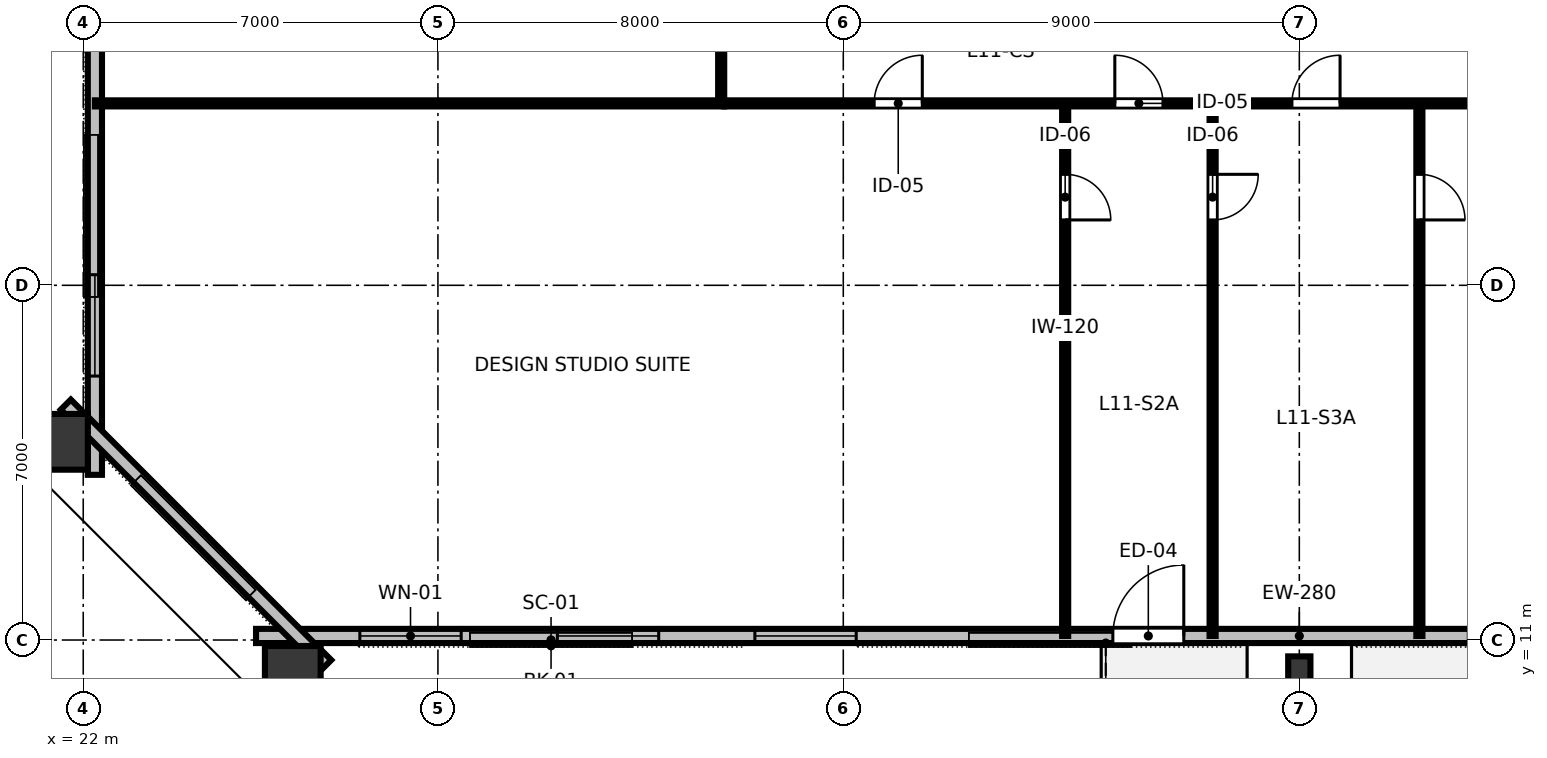
"""IFC4 building model, lengths in metres.
Left out: names, types, materials, properties, quantities, classifications, styles, units other than length and angle.
Written with IfcOpenShell. Run it as: python <this file> out.ifc"""

import sys

from ifc_helpers import new_model, si_unit, direction, frame, frame_2d, origin, origin_2d, place, context, subcontext, project, spatial, rectangle, hollow_rectangle, i_section, extrude, element, fill, save


model = new_model("IFC4")
c1 = context("Model", 3, precision=1e-05, world=origin(), true_north=direction((0.0, 1.0)))
c2 = subcontext(c1, "Body", "Model", "MODEL_VIEW")
j1 = project(units=[si_unit("LENGTHUNIT", "METRE"), si_unit("PLANEANGLEUNIT", "RADIAN")], contexts=[c1])
p1 = place(None, origin())
s1 = spatial("IfcSite", under=j1, at=p1, CompositionType="ELEMENT")
p2 = place(p1, origin())
s2 = spatial("IfcBuilding", under=s1, at=p2, CompositionType="ELEMENT")
p3 = place(p2, frame((0.0, 0.0, 46.0)))
s3 = spatial("IfcBuildingStorey", under=s2, at=p3, CompositionType="ELEMENT", Elevation=46.0)
p4 = place(p3, frame((26.135, 10.232, 0.0), z_axis=(-0.047892071217, -0.094241724682, 0.994396725077), x_axis=(0.891490015287, -0.453040343284, 0.0)))
e1 = element("IfcColumn", 1, at=p4, inside=s3, PredefinedType="COLUMN", context=c2, shape_type="SweptSolid", body=[
    extrude(hollow_rectangle(XDim=1.1, YDim=1.3, WallThickness=0.07, at=origin_2d()), origin(), (0.0, 0.0, 1.0), 3.166),
])
p5 = place(p3, frame((46.0, 10.42, 0.0), z_axis=(0.0, -0.094809092628, 0.995495472594), x_axis=(1.0, 0.0, 0.0)))
e2 = element("IfcColumn", 2, at=p5, inside=s3, PredefinedType="COLUMN", context=c2, shape_type="SweptSolid", body=[
    extrude(i_section(OverallWidth=0.439, OverallDepth=0.514, WebThickness=0.06, FlangeThickness=0.097, FilletRadius=0.025, at=origin_2d()), origin(), (0.0, 0.0, 1.0), 3.162),
])
p6 = place(p3, frame((21.441, 14.911, 0.0), z_axis=(-0.109942970926, -0.032204738505, 0.993416024615), x_axis=(0.953356995981, 0.279259442411, 0.114562655514)))
e3 = element("IfcColumn", 3, at=p6, inside=s3, PredefinedType="COLUMN", context=c2, shape_type="SweptSolid", body=[
    extrude(hollow_rectangle(XDim=1.1, YDim=1.3, WallThickness=0.07, at=origin_2d()), origin(), (0.0, 0.0, 1.0), 3.169),
])
p7 = place(p3, frame((25.41, 11.08, 0.0), z_axis=(0.0, 0.0, 1.0), x_axis=(1.0, 0.0, 0.0)))
e4 = element("IfcWall", 4, at=p7, inside=s3, PredefinedType="STANDARD", context=c2, shape_type="SweptSolid", body=[
    extrude(rectangle(XDim=41.18, YDim=0.28, at=frame_2d((20.59, 0.0))), origin(), (0.0, 0.0, 1.0), 3.15),
])
p8 = place(p7, frame((16.91, 0.0, 0.0)))
e5 = element("IfcOpeningElement", 5, at=p8, cuts=e4, PredefinedType="OPENING", context=c2, shape_type="SweptSolid", body=[
    extrude(rectangle(XDim=1.4, YDim=2.15, at=frame_2d((0.7, 1.075))), frame((0.0, 0.15, 0.0), z_axis=(0.0, -1.0, 0.0), x_axis=(1.0, 0.0, 0.0)), (0.0, 0.0, 1.0), 0.3),
])
p9 = place(p7, frame((2.049, 0.0, 0.8)))
e6 = element("IfcOpeningElement", 6, at=p9, cuts=e4, PredefinedType="OPENING", context=c2, shape_type="SweptSolid", body=[
    extrude(rectangle(XDim=2.0, YDim=1.95, at=frame_2d((1.0, 0.975))), frame((0.0, 0.15, 0.0), z_axis=(0.0, -1.0, 0.0), x_axis=(1.0, 0.0, 0.0)), (0.0, 0.0, 1.0), 0.3),
])
p10 = place(p7, frame((5.947, 0.0, 0.8)))
e7 = element("IfcOpeningElement", 7, at=p10, cuts=e4, PredefinedType="OPENING", context=c2, shape_type="SweptSolid", body=[
    extrude(rectangle(XDim=2.0, YDim=1.95, at=frame_2d((1.0, 0.975))), frame((0.0, 0.15, 0.0), z_axis=(0.0, -1.0, 0.0), x_axis=(1.0, 0.0, 0.0)), (0.0, 0.0, 1.0), 0.3),
])
p11 = place(p7, frame((9.845, 0.0, 0.8)))
e8 = element("IfcOpeningElement", 8, at=p11, cuts=e4, PredefinedType="OPENING", context=c2, shape_type="SweptSolid", body=[
    extrude(rectangle(XDim=2.0, YDim=1.95, at=frame_2d((1.0, 0.975))), frame((0.0, 0.15, 0.0), z_axis=(0.0, -1.0, 0.0), x_axis=(1.0, 0.0, 0.0)), (0.0, 0.0, 1.0), 0.3),
])
p12 = place(p7, frame((25.437, 0.0, 0.8)))
e9 = element("IfcOpeningElement", 9, at=p12, cuts=e4, PredefinedType="OPENING", context=c2, shape_type="SweptSolid", body=[
    extrude(rectangle(XDim=2.0, YDim=1.95, at=frame_2d((1.0, 0.975))), frame((0.0, 0.15, 0.0), z_axis=(0.0, -1.0, 0.0), x_axis=(1.0, 0.0, 0.0)), (0.0, 0.0, 1.0), 0.3),
])
p13 = place(p7, frame((29.335, 0.0, 0.8)))
e10 = element("IfcOpeningElement", 10, at=p13, cuts=e4, PredefinedType="OPENING", context=c2, shape_type="SweptSolid", body=[
    extrude(rectangle(XDim=2.0, YDim=1.95, at=frame_2d((1.0, 0.975))), frame((0.0, 0.15, 0.0), z_axis=(0.0, -1.0, 0.0), x_axis=(1.0, 0.0, 0.0)), (0.0, 0.0, 1.0), 0.3),
])
p14 = place(p7, frame((33.233, 0.0, 0.8)))
e11 = element("IfcOpeningElement", 11, at=p14, cuts=e4, PredefinedType="OPENING", context=c2, shape_type="SweptSolid", body=[
    extrude(rectangle(XDim=2.0, YDim=1.95, at=frame_2d((1.0, 0.975))), frame((0.0, 0.15, 0.0), z_axis=(0.0, -1.0, 0.0), x_axis=(1.0, 0.0, 0.0)), (0.0, 0.0, 1.0), 0.3),
])
p15 = place(p7, frame((37.131, 0.0, 0.8)))
e12 = element("IfcOpeningElement", 12, at=p15, cuts=e4, PredefinedType="OPENING", context=c2, shape_type="SweptSolid", body=[
    extrude(rectangle(XDim=2.0, YDim=1.95, at=frame_2d((1.0, 0.975))), frame((0.0, 0.15, 0.0), z_axis=(0.0, -1.0, 0.0), x_axis=(1.0, 0.0, 0.0)), (0.0, 0.0, 1.0), 0.3),
])
p16 = place(p3, frame((22.23, 49.74, 0.0), z_axis=(0.0, 0.0, 1.0), x_axis=(0.0, -1.0, 0.0)))
e13 = element("IfcWall", 13, at=p16, inside=s3, PredefinedType="STANDARD", context=c2, shape_type="SweptSolid", body=[
    extrude(rectangle(XDim=35.48, YDim=0.28, at=frame_2d((17.74, 0.0))), origin(), (0.0, 0.0, 1.0), 3.15),
])
p17 = place(p16, frame((1.949, 0.0, 0.8)))
e14 = element("IfcOpeningElement", 14, at=p17, cuts=e13, PredefinedType="OPENING", context=c2, shape_type="SweptSolid", body=[
    extrude(rectangle(XDim=2.0, YDim=1.95, at=frame_2d((1.0, 0.975))), frame((0.0, 0.15, 0.0), z_axis=(0.0, -1.0, 0.0), x_axis=(1.0, 0.0, 0.0)), (0.0, 0.0, 1.0), 0.3),
])
p18 = place(p16, frame((9.344, 0.0, 0.8)))
e15 = element("IfcOpeningElement", 15, at=p18, cuts=e13, PredefinedType="OPENING", context=c2, shape_type="SweptSolid", body=[
    extrude(rectangle(XDim=2.0, YDim=1.95, at=frame_2d((1.0, 0.975))), frame((0.0, 0.15, 0.0), z_axis=(0.0, -1.0, 0.0), x_axis=(1.0, 0.0, 0.0)), (0.0, 0.0, 1.0), 0.3),
])
p19 = place(p16, frame((24.135, 0.0, 0.8)))
e16 = element("IfcOpeningElement", 16, at=p19, cuts=e13, PredefinedType="OPENING", context=c2, shape_type="SweptSolid", body=[
    extrude(rectangle(XDim=2.0, YDim=1.95, at=frame_2d((1.0, 0.975))), frame((0.0, 0.15, 0.0), z_axis=(0.0, -1.0, 0.0), x_axis=(1.0, 0.0, 0.0)), (0.0, 0.0, 1.0), 0.3),
])
p20 = place(p16, frame((31.531, 0.0, 0.8)))
e17 = element("IfcOpeningElement", 17, at=p20, cuts=e13, PredefinedType="OPENING", context=c2, shape_type="SweptSolid", body=[
    extrude(rectangle(XDim=2.0, YDim=1.95, at=frame_2d((1.0, 0.975))), frame((0.0, 0.15, 0.0), z_axis=(0.0, -1.0, 0.0), x_axis=(1.0, 0.0, 0.0)), (0.0, 0.0, 1.0), 0.3),
])
p21 = place(p3, frame((21.656, 15.646, 0.0), z_axis=(0.0, 0.0, 1.0), x_axis=(0.707106781187, -0.707106781187, 0.0)))
e18 = element("IfcWall", 18, at=p21, inside=s3, PredefinedType="STANDARD", context=c2, shape_type="SweptSolid", body=[
    extrude(rectangle(XDim=7.268, YDim=0.28, at=frame_2d((3.634, 0.0))), origin(), (0.0, 0.0, 1.0), 3.15),
])
p22 = place(p3, frame((41.379, 21.59, 0.0), z_axis=(0.0, 0.0, 1.0), x_axis=(0.0, -1.0, 0.0)))
e19 = element("IfcWall", 19, at=p22, inside=s3, PredefinedType="PARTITIONING", context=c2, shape_type="SweptSolid", body=[
    extrude(rectangle(XDim=10.51, YDim=0.12, at=frame_2d((5.255, 0.0))), origin(), (0.0, 0.0, 1.0), 2.43),
])
p23 = place(p22, frame((1.4, 0.0, 0.0)))
e20 = element("IfcOpeningElement", 20, at=p23, cuts=e19, PredefinedType="OPENING", context=c2, shape_type="SweptSolid", body=[
    extrude(rectangle(XDim=0.9, YDim=2.15, at=frame_2d((0.45, 1.075))), frame((0.0, 0.07, 0.0), z_axis=(0.0, -1.0, 0.0), x_axis=(1.0, 0.0, 0.0)), (0.0, 0.0, 1.0), 0.14),
])
p24 = place(p3, frame((44.289, 21.59, 0.0), z_axis=(0.0, 0.0, 1.0), x_axis=(0.0, -1.0, 0.0)))
e21 = element("IfcWall", 21, at=p24, inside=s3, PredefinedType="PARTITIONING", context=c2, shape_type="SweptSolid", body=[
    extrude(rectangle(XDim=10.51, YDim=0.12, at=frame_2d((5.255, 0.0))), origin(), (0.0, 0.0, 1.0), 2.43),
])
p25 = place(p24, frame((1.4, 0.0, 0.0)))
e22 = element("IfcOpeningElement", 22, at=p25, cuts=e21, PredefinedType="OPENING", context=c2, shape_type="SweptSolid", body=[
    extrude(rectangle(XDim=0.9, YDim=2.15, at=frame_2d((0.45, 1.075))), frame((0.0, 0.07, 0.0), z_axis=(0.0, -1.0, 0.0), x_axis=(1.0, 0.0, 0.0)), (0.0, 0.0, 1.0), 0.14),
])
p26 = place(p3, frame((48.37, 21.59, 0.0), z_axis=(0.0, 0.0, 1.0), x_axis=(0.0, -1.0, 0.0)))
e23 = element("IfcWall", 23, at=p26, inside=s3, PredefinedType="PARTITIONING", context=c2, shape_type="SweptSolid", body=[
    extrude(rectangle(XDim=10.51, YDim=0.12, at=frame_2d((5.255, 0.0))), origin(), (0.0, 0.0, 1.0), 2.43),
])
p27 = place(p26, frame((1.4, 0.0, 0.0)))
e24 = element("IfcOpeningElement", 24, at=p27, cuts=e23, PredefinedType="OPENING", context=c2, shape_type="SweptSolid", body=[
    extrude(rectangle(XDim=0.9, YDim=2.15, at=frame_2d((0.45, 1.075))), frame((0.0, 0.07, 0.0), z_axis=(0.0, -1.0, 0.0), x_axis=(1.0, 0.0, 0.0)), (0.0, 0.0, 1.0), 0.14),
])
p28 = place(p3, frame((34.65, 21.59, 0.0), z_axis=(0.0, 0.0, 1.0), x_axis=(1.0, 0.0, 0.0)))
e25 = element("IfcWall", 25, at=p28, inside=s3, PredefinedType="PARTITIONING", context=c2, shape_type="SweptSolid", body=[
    extrude(rectangle(XDim=22.7, YDim=0.12, at=frame_2d((11.35, 0.0))), origin(), (0.0, 0.0, 1.0), 2.43),
])
p29 = place(p28, frame((2.959, 0.0, 0.0)))
e26 = element("IfcOpeningElement", 26, at=p29, cuts=e25, PredefinedType="OPENING", context=c2, shape_type="SweptSolid", body=[
    extrude(rectangle(XDim=0.95, YDim=2.15, at=frame_2d((0.475, 1.075))), frame((0.0, 0.07, 0.0), z_axis=(0.0, -1.0, 0.0), x_axis=(1.0, 0.0, 0.0)), (0.0, 0.0, 1.0), 0.14),
])
p30 = place(p28, frame((7.709, 0.0, 0.0)))
e27 = element("IfcOpeningElement", 27, at=p30, cuts=e25, PredefinedType="OPENING", context=c2, shape_type="SweptSolid", body=[
    extrude(rectangle(XDim=0.95, YDim=2.15, at=frame_2d((0.475, 1.075))), frame((0.0, 0.07, 0.0), z_axis=(0.0, -1.0, 0.0), x_axis=(1.0, 0.0, 0.0)), (0.0, 0.0, 1.0), 0.14),
])
p31 = place(p28, frame((11.204, 0.0, 0.0)))
e28 = element("IfcOpeningElement", 28, at=p31, cuts=e25, PredefinedType="OPENING", context=c2, shape_type="SweptSolid", body=[
    extrude(rectangle(XDim=0.95, YDim=2.15, at=frame_2d((0.475, 1.075))), frame((0.0, 0.07, 0.0), z_axis=(0.0, -1.0, 0.0), x_axis=(1.0, 0.0, 0.0)), (0.0, 0.0, 1.0), 0.14),
])
p32 = place(p28, frame((17.665, 0.0, 0.0)))
e29 = element("IfcOpeningElement", 29, at=p32, cuts=e25, PredefinedType="OPENING", context=c2, shape_type="SweptSolid", body=[
    extrude(rectangle(XDim=0.95, YDim=2.15, at=frame_2d((0.475, 1.075))), frame((0.0, 0.07, 0.0), z_axis=(0.0, -1.0, 0.0), x_axis=(1.0, 0.0, 0.0)), (0.0, 0.0, 1.0), 0.14),
])
p33 = place(p3, frame((34.59, 21.65, 0.0), z_axis=(0.0, 0.0, 1.0), x_axis=(0.0, 1.0, 0.0)))
e30 = element("IfcWall", 30, at=p33, inside=s3, PredefinedType="PARTITIONING", context=c2, shape_type="SweptSolid", body=[
    extrude(rectangle(XDim=20.7, YDim=0.12, at=frame_2d((10.35, 0.0))), origin(), (0.0, 0.0, 1.0), 2.43),
])
p34 = place(p33, frame((3.402, 0.0, 0.0)))
e31 = element("IfcOpeningElement", 31, at=p34, cuts=e30, PredefinedType="OPENING", context=c2, shape_type="SweptSolid", body=[
    extrude(rectangle(XDim=0.95, YDim=2.15, at=frame_2d((0.475, 1.075))), frame((0.0, 0.07, 0.0), z_axis=(0.0, -1.0, 0.0), x_axis=(1.0, 0.0, 0.0)), (0.0, 0.0, 1.0), 0.14),
])
p35 = place(p33, frame((9.912, 0.0, 0.0)))
e32 = element("IfcOpeningElement", 32, at=p35, cuts=e30, PredefinedType="OPENING", context=c2, shape_type="SweptSolid", body=[
    extrude(rectangle(XDim=0.95, YDim=2.15, at=frame_2d((0.475, 1.075))), frame((0.0, 0.07, 0.0), z_axis=(0.0, -1.0, 0.0), x_axis=(1.0, 0.0, 0.0)), (0.0, 0.0, 1.0), 0.14),
])
p36 = place(p33, frame((16.385, 0.0, 0.0)))
e33 = element("IfcOpeningElement", 33, at=p36, cuts=e30, PredefinedType="OPENING", context=c2, shape_type="SweptSolid", body=[
    extrude(rectangle(XDim=0.95, YDim=2.15, at=frame_2d((0.475, 1.075))), frame((0.0, 0.07, 0.0), z_axis=(0.0, -1.0, 0.0), x_axis=(1.0, 0.0, 0.0)), (0.0, 0.0, 1.0), 0.14),
])
p37 = place(p3, frame((34.65, 21.59, 0.0), z_axis=(0.0, 0.0, 1.0), x_axis=(-1.0, 0.0, 0.0)))
e34 = element("IfcWall", 34, at=p37, inside=s3, PredefinedType="PARTITIONING", context=c2, shape_type="SweptSolid", body=[
    extrude(rectangle(XDim=12.42, YDim=0.12, at=frame_2d((6.21, 0.0))), origin(), (0.0, 0.0, 1.0), 2.43),
])
p38 = place(p8, origin())
e35 = element("IfcDoor", 35, at=p38, inside=s3, OperationType="SINGLE_SWING_RIGHT", PredefinedType="DOOR", context=c2, shape_type="SweptSolid", body=[
    extrude(rectangle(XDim=1.4, YDim=2.15, at=frame_2d((0.7, 1.075))), frame((0.0, 0.025, 0.0), z_axis=(0.0, -1.0, 0.0), x_axis=(1.0, 0.0, 0.0)), (0.0, 0.0, 1.0), 0.05),
])
fill(e5, e35)
p39 = place(p9, origin())
e36 = element("IfcWindow", 36, at=p39, inside=s3, PartitioningType="SINGLE_PANEL", PredefinedType="WINDOW", context=c2, shape_type="SweptSolid", body=[
    extrude(rectangle(XDim=2.0, YDim=1.95, at=frame_2d((1.0, 0.975))), frame((0.0, 0.03, 0.0), z_axis=(0.0, -1.0, 0.0), x_axis=(1.0, 0.0, 0.0)), (0.0, 0.0, 1.0), 0.06),
])
fill(e6, e36)
p40 = place(p10, origin())
e37 = element("IfcWindow", 37, at=p40, inside=s3, PartitioningType="SINGLE_PANEL", PredefinedType="WINDOW", context=c2, shape_type="SweptSolid", body=[
    extrude(rectangle(XDim=2.0, YDim=1.95, at=frame_2d((1.0, 0.975))), frame((0.0, 0.03, 0.0), z_axis=(0.0, -1.0, 0.0), x_axis=(1.0, 0.0, 0.0)), (0.0, 0.0, 1.0), 0.06),
])
fill(e7, e37)
p41 = place(p11, origin())
e38 = element("IfcWindow", 38, at=p41, inside=s3, PartitioningType="SINGLE_PANEL", PredefinedType="WINDOW", context=c2, shape_type="SweptSolid", body=[
    extrude(rectangle(XDim=2.0, YDim=1.95, at=frame_2d((1.0, 0.975))), frame((0.0, 0.03, 0.0), z_axis=(0.0, -1.0, 0.0), x_axis=(1.0, 0.0, 0.0)), (0.0, 0.0, 1.0), 0.06),
])
fill(e8, e38)
p42 = place(p20, origin())
e39 = element("IfcWindow", 39, at=p42, inside=s3, PartitioningType="SINGLE_PANEL", PredefinedType="WINDOW", context=c2, shape_type="SweptSolid", body=[
    extrude(rectangle(XDim=2.0, YDim=1.95, at=frame_2d((1.0, 0.975))), frame((0.0, 0.03, 0.0), z_axis=(0.0, -1.0, 0.0), x_axis=(1.0, 0.0, 0.0)), (0.0, 0.0, 1.0), 0.06),
])
fill(e17, e39)
p43 = place(p23, origin())
e40 = element("IfcDoor", 40, at=p43, inside=s3, OperationType="SINGLE_SWING_RIGHT", PredefinedType="DOOR", context=c2, shape_type="SweptSolid", body=[
    extrude(rectangle(XDim=0.9, YDim=2.15, at=frame_2d((0.45, 1.075))), frame((0.0, 0.025, 0.0), z_axis=(0.0, -1.0, 0.0), x_axis=(1.0, 0.0, 0.0)), (0.0, 0.0, 1.0), 0.05),
])
fill(e20, e40)
p44 = place(p25, origin())
e41 = element("IfcDoor", 41, at=p44, inside=s3, OperationType="SINGLE_SWING_LEFT", PredefinedType="DOOR", context=c2, shape_type="SweptSolid", body=[
    extrude(rectangle(XDim=0.9, YDim=2.15, at=frame_2d((0.45, 1.075))), frame((0.0, 0.025, 0.0), z_axis=(0.0, -1.0, 0.0), x_axis=(1.0, 0.0, 0.0)), (0.0, 0.0, 1.0), 0.05),
])
fill(e22, e41)
p45 = place(p27, origin())
e42 = element("IfcDoor", 42, at=p45, inside=s3, OperationType="SINGLE_SWING_RIGHT", PredefinedType="DOOR", context=c2, shape_type="SweptSolid", body=[
    extrude(rectangle(XDim=0.9, YDim=2.15, at=frame_2d((0.45, 1.075))), frame((0.0, 0.025, 0.0), z_axis=(0.0, -1.0, 0.0), x_axis=(1.0, 0.0, 0.0)), (0.0, 0.0, 1.0), 0.05),
])
fill(e24, e42)
p46 = place(p29, origin())
e43 = element("IfcDoor", 43, at=p46, inside=s3, OperationType="SINGLE_SWING_RIGHT", PredefinedType="DOOR", context=c2, shape_type="SweptSolid", body=[
    extrude(rectangle(XDim=0.95, YDim=2.15, at=frame_2d((0.475, 1.075))), frame((0.0, 0.025, 0.0), z_axis=(0.0, -1.0, 0.0), x_axis=(1.0, 0.0, 0.0)), (0.0, 0.0, 1.0), 0.05),
])
fill(e26, e43)
p47 = place(p30, origin())
e44 = element("IfcDoor", 44, at=p47, inside=s3, OperationType="SINGLE_SWING_LEFT", PredefinedType="DOOR", context=c2, shape_type="SweptSolid", body=[
    extrude(rectangle(XDim=0.95, YDim=2.15, at=frame_2d((0.475, 1.075))), frame((0.0, 0.025, 0.0), z_axis=(0.0, -1.0, 0.0), x_axis=(1.0, 0.0, 0.0)), (0.0, 0.0, 1.0), 0.05),
])
fill(e27, e44)
p48 = place(p31, origin())
e45 = element("IfcDoor", 45, at=p48, inside=s3, OperationType="SINGLE_SWING_RIGHT", PredefinedType="DOOR", context=c2, shape_type="SweptSolid", body=[
    extrude(rectangle(XDim=0.95, YDim=2.15, at=frame_2d((0.475, 1.075))), frame((0.0, 0.025, 0.0), z_axis=(0.0, -1.0, 0.0), x_axis=(1.0, 0.0, 0.0)), (0.0, 0.0, 1.0), 0.05),
])
fill(e28, e45)
save(model, sys.argv[1])
